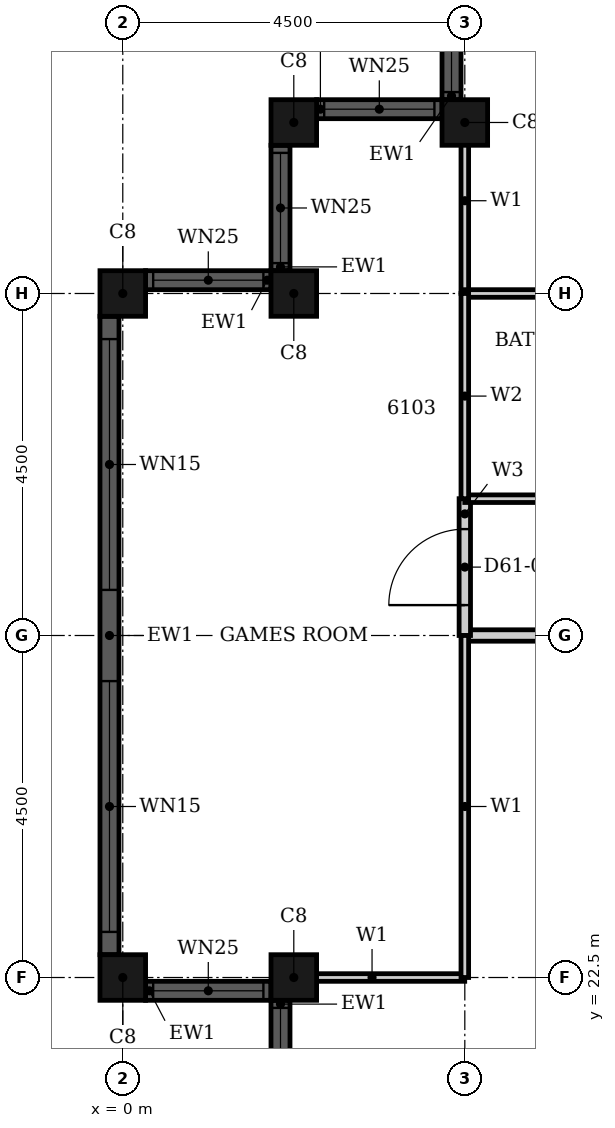
"""IFC4 building model, lengths in metres.
Left out: names, types, materials, properties, quantities, classifications, styles, units other than length and angle.
Written with IfcOpenShell. Run it as: python <this file> out.ifc"""

import sys

from ifc_helpers import new_model, si_unit, direction, frame, frame_2d, origin, origin_2d, place, context, subcontext, project, spatial, rectangle, hollow_rectangle, extrude, element, fill, save


model = new_model("IFC4")
c1 = context("Model", 3, precision=1e-05, world=origin(), true_north=direction((0.0, 1.0)))
c2 = subcontext(c1, "Body", "Model", "MODEL_VIEW")
j1 = project(units=[si_unit("LENGTHUNIT", "METRE"), si_unit("PLANEANGLEUNIT", "RADIAN")], contexts=[c1])
p1 = place(None, origin())
s1 = spatial("IfcSite", under=j1, at=p1, CompositionType="ELEMENT")
p2 = place(p1, origin())
s2 = spatial("IfcBuilding", under=s1, at=p2, CompositionType="ELEMENT")
p3 = place(p2, frame((0.0, 0.0, 241.6)))
s3 = spatial("IfcBuildingStorey", under=s2, at=p3, CompositionType="ELEMENT", Elevation=241.6)
for number, where, z_axis, x_axis in (
    (1, (4.5, 33.75, 0.0), (0.0, 0.0, 1.0), (1.0, 0.0, 0.0)),
    (2, (2.25, 33.75, 0.0), (0.0, 0.0, 1.0), (1.0, 0.0, 0.0)),
    (3, (2.25, 31.5, 0.0), (0.0, 0.0, 1.0), (1.0, 0.0, 0.0)),
    (4, (0.0, 31.5, 0.0), (0.0, 0.0, 1.0), (1.0, 0.0, 0.0)),
    (5, (0.0, 22.5, 0.0), (0.0, 0.0, 1.0), (1.0, 0.0, 0.0)),
    (6, (2.25, 22.5, 0.0), (0.0, 0.0, 1.0), (1.0, 0.0, 0.0)),
):
    element("IfcColumn", number, at=place(p3, frame(where, z_axis=z_axis, x_axis=x_axis)), inside=s3, PredefinedType="COLUMN", context=c2, shape_type="SweptSolid", body=[
        extrude(hollow_rectangle(XDim=0.6, YDim=0.6, WallThickness=0.02, at=origin_2d()), origin(), (0.0, 0.0, 1.0), 3.7),
    ])
p4 = place(p3, frame((4.325, 35.7, 0.0), z_axis=(0.0, 0.0, 1.0), x_axis=(0.0, -1.0, 0.0)))
e7 = element("IfcWall", 7, at=p4, inside=s3, PredefinedType="SOLIDWALL", context=c2, shape_type="SweptSolid", body=[
    extrude(rectangle(XDim=1.65, YDim=0.25, at=frame_2d((0.825, 0.0))), origin(), (0.0, 0.0, 1.0), 3.7),
])
p5 = place(p4, frame((0.1, 0.0, 0.9)))
e8 = element("IfcOpeningElement", 8, at=p5, cuts=e7, PredefinedType="OPENING", context=c2, shape_type="SweptSolid", body=[
    extrude(rectangle(XDim=1.45, YDim=1.85, at=frame_2d((0.725, 0.925))), frame((0.0, 0.135, 0.0), z_axis=(0.0, -1.0, 0.0), x_axis=(1.0, 0.0, 0.0)), (0.0, 0.0, 1.0), 0.27),
])
p6 = place(p3, frame((4.2, 33.925, 0.0), z_axis=(0.0, 0.0, 1.0), x_axis=(-1.0, 0.0, 0.0)))
e9 = element("IfcWall", 9, at=p6, inside=s3, PredefinedType="SOLIDWALL", context=c2, shape_type="SweptSolid", body=[
    extrude(rectangle(XDim=1.65, YDim=0.25, at=frame_2d((0.825, 0.0))), origin(), (0.0, 0.0, 1.0), 3.7),
])
p7 = place(p6, frame((0.1, 0.0, 0.9)))
e10 = element("IfcOpeningElement", 10, at=p7, cuts=e9, PredefinedType="OPENING", context=c2, shape_type="SweptSolid", body=[
    extrude(rectangle(XDim=1.45, YDim=1.85, at=frame_2d((0.725, 0.925))), frame((0.0, 0.135, 0.0), z_axis=(0.0, -1.0, 0.0), x_axis=(1.0, 0.0, 0.0)), (0.0, 0.0, 1.0), 0.27),
])
p8 = place(p3, frame((2.075, 33.45, 0.0), z_axis=(0.0, 0.0, 1.0), x_axis=(0.0, -1.0, 0.0)))
e11 = element("IfcWall", 11, at=p8, inside=s3, PredefinedType="SOLIDWALL", context=c2, shape_type="SweptSolid", body=[
    extrude(rectangle(XDim=1.65, YDim=0.25, at=frame_2d((0.825, 0.0))), origin(), (0.0, 0.0, 1.0), 3.7),
])
p9 = place(p8, frame((0.1, 0.0, 0.9)))
e12 = element("IfcOpeningElement", 12, at=p9, cuts=e11, PredefinedType="OPENING", context=c2, shape_type="SweptSolid", body=[
    extrude(rectangle(XDim=1.45, YDim=1.85, at=frame_2d((0.725, 0.925))), frame((0.0, 0.135, 0.0), z_axis=(0.0, -1.0, 0.0), x_axis=(1.0, 0.0, 0.0)), (0.0, 0.0, 1.0), 0.27),
])
p10 = place(p3, frame((1.95, 31.675, 0.0), z_axis=(0.0, 0.0, 1.0), x_axis=(-1.0, 0.0, 0.0)))
e13 = element("IfcWall", 13, at=p10, inside=s3, PredefinedType="SOLIDWALL", context=c2, shape_type="SweptSolid", body=[
    extrude(rectangle(XDim=1.65, YDim=0.25, at=frame_2d((0.825, 0.0))), origin(), (0.0, 0.0, 1.0), 3.7),
])
p11 = place(p10, frame((0.1, 0.0, 0.9)))
e14 = element("IfcOpeningElement", 14, at=p11, cuts=e13, PredefinedType="OPENING", context=c2, shape_type="SweptSolid", body=[
    extrude(rectangle(XDim=1.45, YDim=1.85, at=frame_2d((0.725, 0.925))), frame((0.0, 0.135, 0.0), z_axis=(0.0, -1.0, 0.0), x_axis=(1.0, 0.0, 0.0)), (0.0, 0.0, 1.0), 0.27),
])
p12 = place(p3, frame((-0.175, 31.2, 0.0), z_axis=(0.0, 0.0, 1.0), x_axis=(0.0, -1.0, 0.0)))
e15 = element("IfcWall", 15, at=p12, inside=s3, PredefinedType="SOLIDWALL", context=c2, shape_type="SweptSolid", body=[
    extrude(rectangle(XDim=8.4, YDim=0.25, at=frame_2d((4.2, 0.0))), origin(), (0.0, 0.0, 1.0), 3.7),
])
p13 = place(p12, frame((0.3, 0.0, 0.45)))
e16 = element("IfcOpeningElement", 16, at=p13, cuts=e15, PredefinedType="OPENING", context=c2, shape_type="SweptSolid", body=[
    extrude(rectangle(XDim=3.3, YDim=2.3, at=frame_2d((1.65, 1.15))), frame((0.0, 0.135, 0.0), z_axis=(0.0, -1.0, 0.0), x_axis=(1.0, 0.0, 0.0)), (0.0, 0.0, 1.0), 0.27),
])
p14 = place(p12, frame((4.8, 0.0, 0.45)))
e17 = element("IfcOpeningElement", 17, at=p14, cuts=e15, PredefinedType="OPENING", context=c2, shape_type="SweptSolid", body=[
    extrude(rectangle(XDim=3.3, YDim=2.3, at=frame_2d((1.65, 1.15))), frame((0.0, 0.135, 0.0), z_axis=(0.0, -1.0, 0.0), x_axis=(1.0, 0.0, 0.0)), (0.0, 0.0, 1.0), 0.27),
])
p15 = place(p3, frame((0.3, 22.325, 0.0), z_axis=(0.0, 0.0, 1.0), x_axis=(1.0, 0.0, 0.0)))
e18 = element("IfcWall", 18, at=p15, inside=s3, PredefinedType="SOLIDWALL", context=c2, shape_type="SweptSolid", body=[
    extrude(rectangle(XDim=1.65, YDim=0.25, at=frame_2d((0.825, 0.0))), origin(), (0.0, 0.0, 1.0), 3.7),
])
p16 = place(p15, frame((0.1, 0.0, 0.9)))
e19 = element("IfcOpeningElement", 19, at=p16, cuts=e18, PredefinedType="OPENING", context=c2, shape_type="SweptSolid", body=[
    extrude(rectangle(XDim=1.45, YDim=1.85, at=frame_2d((0.725, 0.925))), frame((0.0, 0.135, 0.0), z_axis=(0.0, -1.0, 0.0), x_axis=(1.0, 0.0, 0.0)), (0.0, 0.0, 1.0), 0.27),
])
p17 = place(p3, frame((2.075, 22.2, 0.0), z_axis=(0.0, 0.0, 1.0), x_axis=(0.0, -1.0, 0.0)))
e20 = element("IfcWall", 20, at=p17, inside=s3, PredefinedType="SOLIDWALL", context=c2, shape_type="SweptSolid", body=[
    extrude(rectangle(XDim=1.65, YDim=0.25, at=frame_2d((0.825, 0.0))), origin(), (0.0, 0.0, 1.0), 3.7),
])
p18 = place(p17, frame((0.1, 0.0, 0.9)))
e21 = element("IfcOpeningElement", 21, at=p18, cuts=e20, PredefinedType="OPENING", context=c2, shape_type="SweptSolid", body=[
    extrude(rectangle(XDim=1.45, YDim=1.85, at=frame_2d((0.725, 0.925))), frame((0.0, 0.135, 0.0), z_axis=(0.0, -1.0, 0.0), x_axis=(1.0, 0.0, 0.0)), (0.0, 0.0, 1.0), 0.27),
])
p19 = place(p3, frame((4.5, 27.0, 0.0), z_axis=(0.0, 0.0, 1.0), x_axis=(1.0, 0.0, 0.0)))
e22 = element("IfcWall", 22, at=p19, inside=s3, PredefinedType="PARTITIONING", context=c2, shape_type="SweptSolid", body=[
    extrude(rectangle(XDim=13.5, YDim=0.15, at=frame_2d((6.75, 0.0))), origin(), (0.0, 0.0, 1.0), 2.68),
])
p20 = place(p19, frame((5.35, 0.0, 0.0)))
e23 = element("IfcOpeningElement", 23, at=p20, cuts=e22, PredefinedType="OPENING", context=c2, shape_type="SweptSolid", body=[
    extrude(rectangle(XDim=1.0, YDim=2.1, at=frame_2d((0.5, 1.05))), frame((0.0, 0.085, 0.0), z_axis=(0.0, -1.0, 0.0), x_axis=(1.0, 0.0, 0.0)), (0.0, 0.0, 1.0), 0.17),
])
p21 = place(p3, frame((4.5, 27.0, 0.0), z_axis=(0.0, 0.0, 1.0), x_axis=(0.0, 1.0, 0.0)))
e24 = element("IfcWall", 24, at=p21, inside=s3, PredefinedType="PARTITIONING", context=c2, shape_type="SweptSolid", body=[
    extrude(rectangle(XDim=1.8, YDim=0.15, at=frame_2d((0.9, 0.0))), origin(), (0.0, 0.0, 1.0), 3.4),
])
p22 = place(p21, frame((0.4, 0.0, 0.0)))
e25 = element("IfcOpeningElement", 25, at=p22, cuts=e24, PredefinedType="OPENING", context=c2, shape_type="SweptSolid", body=[
    extrude(rectangle(XDim=1.0, YDim=2.1, at=frame_2d((0.5, 1.05))), frame((0.0, 0.085, 0.0), z_axis=(0.0, -1.0, 0.0), x_axis=(1.0, 0.0, 0.0)), (0.0, 0.0, 1.0), 0.17),
])
p23 = place(p3, frame((2.06, 22.5, 0.0), z_axis=(0.0, 0.0, 1.0), x_axis=(1.0, 0.0, 0.0)))
e26 = element("IfcWall", 26, at=p23, inside=s3, PredefinedType="PARTITIONING", context=c2, shape_type="SweptSolid", body=[
    extrude(rectangle(XDim=2.439, YDim=0.1, at=frame_2d((1.219, 0.0))), origin(), (0.0, 0.0, 1.0), 2.68),
])
p24 = place(p3, frame((4.5, 31.501, 0.0), z_axis=(0.0, 0.0, 1.0), x_axis=(0.0, 1.0, 0.0)))
e27 = element("IfcWall", 27, at=p24, inside=s3, PredefinedType="PARTITIONING", context=c2, shape_type="SweptSolid", body=[
    extrude(rectangle(XDim=2.439, YDim=0.1, at=frame_2d((1.219, 0.0))), origin(), (0.0, 0.0, 1.0), 3.4),
])
p25 = place(p3, frame((4.5, 22.5, 0.0), z_axis=(0.0, 0.0, 1.0), x_axis=(0.0, 1.0, 0.0)))
e28 = element("IfcWall", 28, at=p25, inside=s3, PredefinedType="PARTITIONING", context=c2, shape_type="SweptSolid", body=[
    extrude(rectangle(XDim=4.5, YDim=0.1, at=frame_2d((2.25, 0.0))), origin(), (0.0, 0.0, 1.0), 3.4),
])
p26 = place(p3, frame((4.5, 28.8, 0.0), z_axis=(0.0, 0.0, 1.0), x_axis=(1.0, 0.0, 0.0)))
e29 = element("IfcWall", 29, at=p26, inside=s3, PredefinedType="PARTITIONING", context=c2, shape_type="SweptSolid", body=[
    extrude(rectangle(XDim=2.4, YDim=0.1, at=frame_2d((1.2, 0.0))), origin(), (0.0, 0.0, 1.0), 3.4),
])
p27 = place(p3, frame((4.5, 31.5, 0.0), z_axis=(0.0, 0.0, 1.0), x_axis=(1.0, 0.0, 0.0)))
e30 = element("IfcWall", 30, at=p27, inside=s3, PredefinedType="PARTITIONING", context=c2, shape_type="SweptSolid", body=[
    extrude(rectangle(XDim=2.4, YDim=0.1, at=frame_2d((1.2, 0.0))), origin(), (0.0, 0.0, 1.0), 2.68),
])
p28 = place(p3, frame((4.5, 28.8, 0.0), z_axis=(0.0, 0.0, 1.0), x_axis=(0.0, 1.0, 0.0)))
e31 = element("IfcWall", 31, at=p28, inside=s3, PredefinedType="PARTITIONING", context=c2, shape_type="SweptSolid", body=[
    extrude(rectangle(XDim=2.7, YDim=0.1, at=frame_2d((1.35, 0.0))), origin(), (0.0, 0.0, 1.0), 3.4),
])
p29 = place(p5, origin())
e32 = element("IfcWindow", 32, at=p29, inside=s3, PartitioningType="SINGLE_PANEL", PredefinedType="WINDOW", context=c2, shape_type="SweptSolid", body=[
    extrude(rectangle(XDim=1.45, YDim=1.85, at=frame_2d((0.725, 0.925))), frame((0.0, 0.03, 0.0), z_axis=(0.0, -1.0, 0.0), x_axis=(1.0, 0.0, 0.0)), (0.0, 0.0, 1.0), 0.06),
])
fill(e8, e32)
p30 = place(p7, origin())
e33 = element("IfcWindow", 33, at=p30, inside=s3, PartitioningType="SINGLE_PANEL", PredefinedType="WINDOW", context=c2, shape_type="SweptSolid", body=[
    extrude(rectangle(XDim=1.45, YDim=1.85, at=frame_2d((0.725, 0.925))), frame((0.0, 0.03, 0.0), z_axis=(0.0, -1.0, 0.0), x_axis=(1.0, 0.0, 0.0)), (0.0, 0.0, 1.0), 0.06),
])
fill(e10, e33)
p31 = place(p9, origin())
e34 = element("IfcWindow", 34, at=p31, inside=s3, PartitioningType="SINGLE_PANEL", PredefinedType="WINDOW", context=c2, shape_type="SweptSolid", body=[
    extrude(rectangle(XDim=1.45, YDim=1.85, at=frame_2d((0.725, 0.925))), frame((0.0, 0.03, 0.0), z_axis=(0.0, -1.0, 0.0), x_axis=(1.0, 0.0, 0.0)), (0.0, 0.0, 1.0), 0.06),
])
fill(e12, e34)
p32 = place(p11, origin())
e35 = element("IfcWindow", 35, at=p32, inside=s3, PartitioningType="SINGLE_PANEL", PredefinedType="WINDOW", context=c2, shape_type="SweptSolid", body=[
    extrude(rectangle(XDim=1.45, YDim=1.85, at=frame_2d((0.725, 0.925))), frame((0.0, 0.03, 0.0), z_axis=(0.0, -1.0, 0.0), x_axis=(1.0, 0.0, 0.0)), (0.0, 0.0, 1.0), 0.06),
])
fill(e14, e35)
p33 = place(p13, origin())
e36 = element("IfcWindow", 36, at=p33, inside=s3, PartitioningType="SINGLE_PANEL", PredefinedType="WINDOW", context=c2, shape_type="SweptSolid", body=[
    extrude(rectangle(XDim=3.3, YDim=2.3, at=frame_2d((1.65, 1.15))), frame((0.0, 0.03, 0.0), z_axis=(0.0, -1.0, 0.0), x_axis=(1.0, 0.0, 0.0)), (0.0, 0.0, 1.0), 0.06),
])
fill(e16, e36)
p34 = place(p14, origin())
e37 = element("IfcWindow", 37, at=p34, inside=s3, PartitioningType="SINGLE_PANEL", PredefinedType="WINDOW", context=c2, shape_type="SweptSolid", body=[
    extrude(rectangle(XDim=3.3, YDim=2.3, at=frame_2d((1.65, 1.15))), frame((0.0, 0.03, 0.0), z_axis=(0.0, -1.0, 0.0), x_axis=(1.0, 0.0, 0.0)), (0.0, 0.0, 1.0), 0.06),
])
fill(e17, e37)
p35 = place(p16, origin())
e38 = element("IfcWindow", 38, at=p35, inside=s3, PartitioningType="SINGLE_PANEL", PredefinedType="WINDOW", context=c2, shape_type="SweptSolid", body=[
    extrude(rectangle(XDim=1.45, YDim=1.85, at=frame_2d((0.725, 0.925))), frame((0.0, 0.03, 0.0), z_axis=(0.0, -1.0, 0.0), x_axis=(1.0, 0.0, 0.0)), (0.0, 0.0, 1.0), 0.06),
])
fill(e19, e38)
p36 = place(p18, origin())
e39 = element("IfcWindow", 39, at=p36, inside=s3, PartitioningType="SINGLE_PANEL", PredefinedType="WINDOW", context=c2, shape_type="SweptSolid", body=[
    extrude(rectangle(XDim=1.45, YDim=1.85, at=frame_2d((0.725, 0.925))), frame((0.0, 0.03, 0.0), z_axis=(0.0, -1.0, 0.0), x_axis=(1.0, 0.0, 0.0)), (0.0, 0.0, 1.0), 0.06),
])
fill(e21, e39)
p37 = place(p22, origin())
e40 = element("IfcDoor", 40, at=p37, inside=s3, OperationType="SINGLE_SWING_LEFT", PredefinedType="DOOR", context=c2, shape_type="SweptSolid", body=[
    extrude(rectangle(XDim=1.0, YDim=2.1, at=frame_2d((0.5, 1.05))), frame((0.0, 0.025, 0.0), z_axis=(0.0, -1.0, 0.0), x_axis=(1.0, 0.0, 0.0)), (0.0, 0.0, 1.0), 0.05),
])
fill(e25, e40)
save(model, sys.argv[1])
